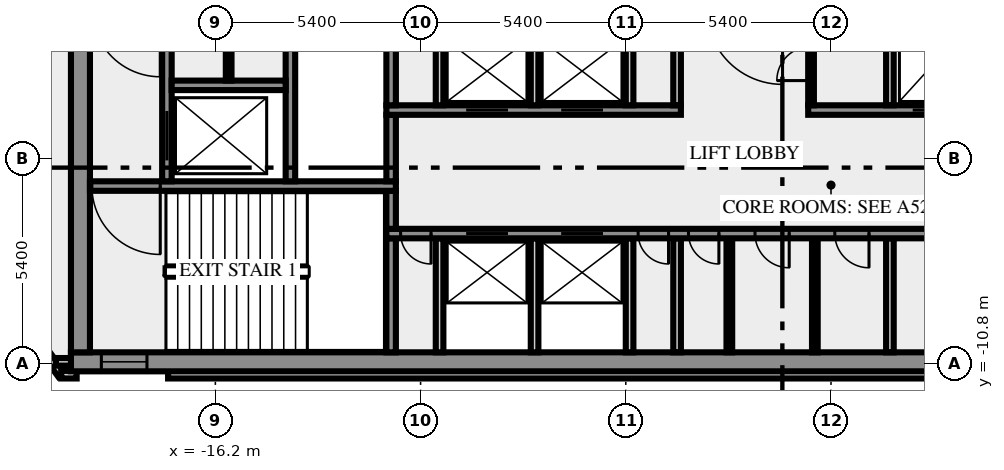
"""IFC4 building model, lengths in metres.
Left out: names, types, materials, properties, quantities, classifications, styles, units other than length and angle.
Written with IfcOpenShell. Run it as: python <this file> out.ifc"""

import sys

from ifc_helpers import new_model, si_unit, direction, frame, frame_2d, origin, place, context, subcontext, project, spatial, rectangle, extrude, element, fill, save


model = new_model("IFC4")
c1 = context("Model", 3, precision=1e-05, world=origin(), true_north=direction((0.0, 1.0)))
c2 = subcontext(c1, "Body", "Model", "MODEL_VIEW")
j1 = project(units=[si_unit("LENGTHUNIT", "METRE"), si_unit("PLANEANGLEUNIT", "RADIAN")], contexts=[c1])
p1 = place(None, origin())
s1 = spatial("IfcSite", under=j1, at=p1, CompositionType="ELEMENT")
p2 = place(p1, origin())
s2 = spatial("IfcBuilding", under=s1, at=p2, CompositionType="ELEMENT")
p3 = place(p2, frame((0.0, 0.0, 351.0)))
s3 = spatial("IfcBuildingStorey", under=s2, at=p3, CompositionType="ELEMENT", Elevation=351.0)
p4 = place(p3, frame((-21.833, -8.909, 0.0), z_axis=(0.0, 0.0, 1.0), x_axis=(0.587766567315, -0.809030569476, 0.0)))
e1 = element("IfcWall", 1, at=p4, inside=s3, PredefinedType="SOLIDWALL", context=c2, shape_type="SweptSolid", body=[
    extrude(rectangle(XDim=2.688, YDim=0.2, at=frame_2d((1.344, 0.0))), origin(), (0.0, 0.0, 1.0), 3.2),
])
p5 = place(p3, frame((-20.256, -11.088, 0.0), z_axis=(0.0, 0.0, 1.0), x_axis=(1.0, 0.0, 0.0)))
e2 = element("IfcWall", 2, at=p5, inside=s3, PredefinedType="SOLIDWALL", context=c2, shape_type="SweptSolid", body=[
    extrude(rectangle(XDim=0.406, YDim=0.2, at=frame_2d((0.203, 0.0))), origin(), (0.0, 0.0, 1.0), 3.2),
])
p6 = place(p3, frame((-17.444, -11.088, 0.0), z_axis=(0.0, 0.0, 1.0), x_axis=(1.0, 0.0, 0.0)))
e3 = element("IfcWall", 3, at=p6, inside=s3, PredefinedType="SOLIDWALL", context=c2, shape_type="SweptSolid", body=[
    extrude(rectangle(XDim=34.888, YDim=0.2, at=frame_2d((17.444, 0.0))), origin(), (0.0, 0.0, 1.0), 3.2),
])
p7 = place(p3, frame((-19.98, -10.75, 0.0), z_axis=(0.0, 0.0, 1.0), x_axis=(-1.0, 0.0, 0.0)))
e4 = element("IfcWall", 4, at=p7, inside=s3, PredefinedType="SOLIDWALL", context=c2, shape_type="SweptSolid", body=[
    extrude(rectangle(XDim=0.417, YDim=0.2, at=frame_2d((0.208, 0.0))), origin(), (0.0, 0.0, 1.0), 3.2),
])
p8 = place(p3, frame((-20.0, -10.75, 0.0), z_axis=(0.0, 0.0, 1.0), x_axis=(1.0, 0.0, 0.0)))
e5 = element("IfcWall", 5, at=p8, inside=s3, PredefinedType="SHEAR", context=c2, shape_type="SweptSolid", body=[
    extrude(rectangle(XDim=40.0, YDim=0.5, at=frame_2d((20.0, 0.0))), origin(), (0.0, 0.0, 1.0), 3.2),
])
p9 = place(p8, frame((0.8, 0.0, 1.0)))
e6 = element("IfcOpeningElement", 6, at=p9, cuts=e5, PredefinedType="OPENING", context=c2, shape_type="SweptSolid", body=[
    extrude(rectangle(XDim=1.2, YDim=1.2, at=frame_2d((0.6, 0.6))), frame((0.0, 0.26, 0.0), z_axis=(0.0, -1.0, 0.0), x_axis=(1.0, 0.0, 0.0)), (0.0, 0.0, 1.0), 0.52),
])
p10 = place(p8, frame((38.0, 0.0, 1.0)))
e7 = element("IfcOpeningElement", 7, at=p10, cuts=e5, PredefinedType="OPENING", context=c2, shape_type="SweptSolid", body=[
    extrude(rectangle(XDim=1.2, YDim=1.2, at=frame_2d((0.6, 0.6))), frame((0.0, 0.26, 0.0), z_axis=(0.0, -1.0, 0.0), x_axis=(1.0, 0.0, 0.0)), (0.0, 0.0, 1.0), 0.52),
])
p11 = place(p3, frame((-19.75, -10.5, 0.0), z_axis=(0.0, 0.0, 1.0), x_axis=(0.0, 1.0, 0.0)))
e8 = element("IfcWall", 8, at=p11, inside=s3, PredefinedType="SHEAR", context=c2, shape_type="SweptSolid", body=[
    extrude(rectangle(XDim=8.8, YDim=0.5, at=frame_2d((4.4, 0.0))), origin(), (0.0, 0.0, 1.0), 3.2),
])
p12 = place(p3, frame((-11.575, -10.5, 0.0), z_axis=(0.0, 0.0, 1.0), x_axis=(0.0, 1.0, 0.0)))
e9 = element("IfcWall", 9, at=p12, inside=s3, PredefinedType="SHEAR", context=c2, shape_type="SweptSolid", body=[
    extrude(rectangle(XDim=3.0, YDim=0.25, at=frame_2d((1.5, 0.0))), origin(), (0.0, 0.0, 1.0), 3.2),
])
for number, where, z_axis, x_axis in (
    (10, (-10.3, -10.5, 0.0), (0.0, 0.0, 1.0), (0.0, 1.0, 0.0)),
    (11, (-7.8, -10.5, 0.0), (0.0, 0.0, 1.0), (0.0, 1.0, 0.0)),
    (12, (-5.3, -10.5, 0.0), (0.0, 0.0, 1.0), (0.0, 1.0, 0.0)),
    (13, (-4.05, -10.5, 0.0), (0.0, 0.0, 1.0), (0.0, 1.0, 0.0)),
):
    element("IfcWall", number, at=place(p3, frame(where, z_axis=z_axis, x_axis=x_axis)), inside=s3, PredefinedType="SOLIDWALL", context=c2, shape_type="SweptSolid", body=[
        extrude(rectangle(XDim=3.0, YDim=0.2, at=frame_2d((1.5, 0.0))), origin(), (0.0, 0.0, 1.0), 3.2),
    ])
for number, where, z_axis, x_axis in (
    (14, (-2.675, -10.5, 0.0), (0.0, 0.0, 1.0), (0.0, 1.0, 0.0)),
    (15, (-0.425, -10.5, 0.0), (0.0, 0.0, 1.0), (0.0, 1.0, 0.0)),
):
    element("IfcWall", number, at=place(p3, frame(where, z_axis=z_axis, x_axis=x_axis)), inside=s3, PredefinedType="PARTITIONING", context=c2, shape_type="SweptSolid", body=[
        extrude(rectangle(XDim=3.0, YDim=0.15, at=frame_2d((1.5, 0.0))), origin(), (0.0, 0.0, 1.0), 3.2),
    ])
p13 = place(p3, frame((1.55, -10.5, 0.0), z_axis=(0.0, 0.0, 1.0), x_axis=(0.0, 1.0, 0.0)))
e16 = element("IfcWall", 16, at=p13, inside=s3, PredefinedType="SOLIDWALL", context=c2, shape_type="SweptSolid", body=[
    extrude(rectangle(XDim=3.0, YDim=0.2, at=frame_2d((1.5, 0.0))), origin(), (0.0, 0.0, 1.0), 3.2),
])
p14 = place(p3, frame((11.7, -7.375, 0.0), z_axis=(0.0, 0.0, 1.0), x_axis=(-1.0, 0.0, 0.0)))
e17 = element("IfcWall", 17, at=p14, inside=s3, PredefinedType="SHEAR", context=c2, shape_type="SweptSolid", body=[
    extrude(rectangle(XDim=23.4, YDim=0.25, at=frame_2d((11.7, 0.0))), origin(), (0.0, 0.0, 1.0), 3.2),
])
p15 = place(p14, frame((22.225, 0.0, 0.0)))
e18 = element("IfcOpeningElement", 18, at=p15, cuts=e17, PredefinedType="OPENING", context=c2, shape_type="SweptSolid", body=[
    extrude(rectangle(XDim=0.8, YDim=2.1, at=frame_2d((0.4, 1.05))), frame((0.0, 0.135, 0.0), z_axis=(0.0, -1.0, 0.0), x_axis=(1.0, 0.0, 0.0)), (0.0, 0.0, 1.0), 0.27),
])
p16 = place(p14, frame((20.2, 0.0, 0.0)))
e19 = element("IfcOpeningElement", 19, at=p16, cuts=e17, PredefinedType="OPENING", context=c2, shape_type="SweptSolid", body=[
    extrude(rectangle(XDim=1.1, YDim=2.1, at=frame_2d((0.55, 1.05))), frame((0.0, 0.135, 0.0), z_axis=(0.0, -1.0, 0.0), x_axis=(1.0, 0.0, 0.0)), (0.0, 0.0, 1.0), 0.27),
])
p17 = place(p14, frame((17.7, 0.0, 0.0)))
e20 = element("IfcOpeningElement", 20, at=p17, cuts=e17, PredefinedType="OPENING", context=c2, shape_type="SweptSolid", body=[
    extrude(rectangle(XDim=1.1, YDim=2.1, at=frame_2d((0.55, 1.05))), frame((0.0, 0.135, 0.0), z_axis=(0.0, -1.0, 0.0), x_axis=(1.0, 0.0, 0.0)), (0.0, 0.0, 1.0), 0.27),
])
p18 = place(p14, frame((15.975, 0.0, 0.0)))
e21 = element("IfcOpeningElement", 21, at=p18, cuts=e17, PredefinedType="OPENING", context=c2, shape_type="SweptSolid", body=[
    extrude(rectangle(XDim=0.8, YDim=2.1, at=frame_2d((0.4, 1.05))), frame((0.0, 0.135, 0.0), z_axis=(0.0, -1.0, 0.0), x_axis=(1.0, 0.0, 0.0)), (0.0, 0.0, 1.0), 0.27),
])
p19 = place(p14, frame((14.65, 0.0, 0.0)))
e22 = element("IfcOpeningElement", 22, at=p19, cuts=e17, PredefinedType="OPENING", context=c2, shape_type="SweptSolid", body=[
    extrude(rectangle(XDim=0.8, YDim=2.1, at=frame_2d((0.4, 1.05))), frame((0.0, 0.135, 0.0), z_axis=(0.0, -1.0, 0.0), x_axis=(1.0, 0.0, 0.0)), (0.0, 0.0, 1.0), 0.27),
])
p20 = place(p14, frame((12.8, 0.0, 0.0)))
e23 = element("IfcOpeningElement", 23, at=p20, cuts=e17, PredefinedType="OPENING", context=c2, shape_type="SweptSolid", body=[
    extrude(rectangle(XDim=0.9, YDim=2.1, at=frame_2d((0.45, 1.05))), frame((0.0, 0.135, 0.0), z_axis=(0.0, -1.0, 0.0), x_axis=(1.0, 0.0, 0.0)), (0.0, 0.0, 1.0), 0.27),
])
p21 = place(p14, frame((10.7, 0.0, 0.0)))
e24 = element("IfcOpeningElement", 24, at=p21, cuts=e17, PredefinedType="OPENING", context=c2, shape_type="SweptSolid", body=[
    extrude(rectangle(XDim=0.9, YDim=2.1, at=frame_2d((0.45, 1.05))), frame((0.0, 0.135, 0.0), z_axis=(0.0, -1.0, 0.0), x_axis=(1.0, 0.0, 0.0)), (0.0, 0.0, 1.0), 0.27),
])
p22 = place(p14, frame((4.7, 0.0, 0.0)))
e25 = element("IfcOpeningElement", 25, at=p22, cuts=e17, PredefinedType="OPENING", context=c2, shape_type="SweptSolid", body=[
    extrude(rectangle(XDim=0.9, YDim=2.1, at=frame_2d((0.45, 1.05))), frame((0.0, 0.135, 0.0), z_axis=(0.0, -1.0, 0.0), x_axis=(1.0, 0.0, 0.0)), (0.0, 0.0, 1.0), 0.27),
])
p23 = place(p3, frame((-11.575, -7.25, 0.0), z_axis=(0.0, 0.0, 1.0), x_axis=(0.0, 1.0, 0.0)))
e26 = element("IfcWall", 26, at=p23, inside=s3, PredefinedType="SHEAR", context=c2, shape_type="SweptSolid", body=[
    extrude(rectangle(XDim=1.0, YDim=0.25, at=frame_2d((0.5, 0.0))), origin(), (0.0, 0.0, 1.0), 3.2),
])
p24 = place(p3, frame((-11.45, -6.125, 0.0), z_axis=(0.0, 0.0, 1.0), x_axis=(-1.0, 0.0, 0.0)))
e27 = element("IfcWall", 27, at=p24, inside=s3, PredefinedType="SHEAR", context=c2, shape_type="SweptSolid", body=[
    extrude(rectangle(XDim=8.05, YDim=0.25, at=frame_2d((4.025, 0.0))), origin(), (0.0, 0.0, 1.0), 3.2),
])
p25 = place(p24, frame((6.2, 0.0, 0.0)))
e28 = element("IfcOpeningElement", 28, at=p25, cuts=e27, PredefinedType="OPENING", context=c2, shape_type="SweptSolid", body=[
    extrude(rectangle(XDim=1.8, YDim=2.1, at=frame_2d((0.9, 1.05))), frame((0.0, 0.135, 0.0), z_axis=(0.0, -1.0, 0.0), x_axis=(1.0, 0.0, 0.0)), (0.0, 0.0, 1.0), 0.27),
])
p26 = place(p3, frame((-17.475, -6.0, 0.0), z_axis=(0.0, 0.0, 1.0), x_axis=(0.0, 1.0, 0.0)))
e29 = element("IfcWall", 29, at=p26, inside=s3, PredefinedType="SHEAR", context=c2, shape_type="SweptSolid", body=[
    extrude(rectangle(XDim=4.3, YDim=0.25, at=frame_2d((2.15, 0.0))), origin(), (0.0, 0.0, 1.0), 3.2),
])
p27 = place(p26, frame((0.55, 0.0, 0.0)))
e30 = element("IfcOpeningElement", 30, at=p27, cuts=e29, PredefinedType="OPENING", context=c2, shape_type="SweptSolid", body=[
    extrude(rectangle(XDim=1.3, YDim=2.1, at=frame_2d((0.65, 1.05))), frame((0.0, 0.135, 0.0), z_axis=(0.0, -1.0, 0.0), x_axis=(1.0, 0.0, 0.0)), (0.0, 0.0, 1.0), 0.27),
])
p28 = place(p3, frame((-14.225, -6.0, 0.0), z_axis=(0.0, 0.0, 1.0), x_axis=(0.0, 1.0, 0.0)))
e31 = element("IfcWall", 31, at=p28, inside=s3, PredefinedType="SHEAR", context=c2, shape_type="SweptSolid", body=[
    extrude(rectangle(XDim=4.3, YDim=0.25, at=frame_2d((2.15, 0.0))), origin(), (0.0, 0.0, 1.0), 3.2),
])
p29 = place(p3, frame((-11.575, -6.0, 0.0), z_axis=(0.0, 0.0, 1.0), x_axis=(0.0, 1.0, 0.0)))
e32 = element("IfcWall", 32, at=p29, inside=s3, PredefinedType="SHEAR", context=c2, shape_type="SweptSolid", body=[
    extrude(rectangle(XDim=1.75, YDim=0.25, at=frame_2d((0.875, 0.0))), origin(), (0.0, 0.0, 1.0), 3.2),
])
p30 = place(p3, frame((-11.7, -4.125, 0.0), z_axis=(0.0, 0.0, 1.0), x_axis=(1.0, 0.0, 0.0)))
e33 = element("IfcWall", 33, at=p30, inside=s3, PredefinedType="SHEAR", context=c2, shape_type="SweptSolid", body=[
    extrude(rectangle(XDim=7.75, YDim=0.25, at=frame_2d((3.875, 0.0))), origin(), (0.0, 0.0, 1.0), 3.2),
])
p31 = place(p30, frame((2.1, 0.0, 0.0)))
e34 = element("IfcOpeningElement", 34, at=p31, cuts=e33, PredefinedType="OPENING", context=c2, shape_type="SweptSolid", body=[
    extrude(rectangle(XDim=1.1, YDim=2.1, at=frame_2d((0.55, 1.05))), frame((0.0, 0.135, 0.0), z_axis=(0.0, -1.0, 0.0), x_axis=(1.0, 0.0, 0.0)), (0.0, 0.0, 1.0), 0.27),
])
p32 = place(p30, frame((4.6, 0.0, 0.0)))
e35 = element("IfcOpeningElement", 35, at=p32, cuts=e33, PredefinedType="OPENING", context=c2, shape_type="SweptSolid", body=[
    extrude(rectangle(XDim=1.1, YDim=2.1, at=frame_2d((0.55, 1.05))), frame((0.0, 0.135, 0.0), z_axis=(0.0, -1.0, 0.0), x_axis=(1.0, 0.0, 0.0)), (0.0, 0.0, 1.0), 0.27),
])
p33 = place(p3, frame((-0.6, -4.125, 0.0), z_axis=(0.0, 0.0, 1.0), x_axis=(1.0, 0.0, 0.0)))
e36 = element("IfcWall", 36, at=p33, inside=s3, PredefinedType="SHEAR", context=c2, shape_type="SweptSolid", body=[
    extrude(rectangle(XDim=12.3, YDim=0.25, at=frame_2d((6.15, 0.0))), origin(), (0.0, 0.0, 1.0), 3.2),
])
p34 = place(p33, frame((2.75, 0.0, 0.0)))
e37 = element("IfcOpeningElement", 37, at=p34, cuts=e36, PredefinedType="OPENING", context=c2, shape_type="SweptSolid", body=[
    extrude(rectangle(XDim=1.3, YDim=2.1, at=frame_2d((0.65, 1.05))), frame((0.0, 0.135, 0.0), z_axis=(0.0, -1.0, 0.0), x_axis=(1.0, 0.0, 0.0)), (0.0, 0.0, 1.0), 0.27),
])
p35 = place(p3, frame((-11.575, -4.0, 0.0), z_axis=(0.0, 0.0, 1.0), x_axis=(0.0, 1.0, 0.0)))
e38 = element("IfcWall", 38, at=p35, inside=s3, PredefinedType="SHEAR", context=c2, shape_type="SweptSolid", body=[
    extrude(rectangle(XDim=2.3, YDim=0.25, at=frame_2d((1.15, 0.0))), origin(), (0.0, 0.0, 1.0), 3.2),
])
for number, where, z_axis, x_axis in (
    (39, (-10.3, -4.0, 0.0), (0.0, 0.0, 1.0), (0.0, 1.0, 0.0)),
    (40, (-7.8, -4.0, 0.0), (0.0, 0.0, 1.0), (0.0, 1.0, 0.0)),
    (41, (-5.3, -4.0, 0.0), (0.0, 0.0, 1.0), (0.0, 1.0, 0.0)),
    (42, (-4.05, -4.0, 0.0), (0.0, 0.0, 1.0), (0.0, 1.0, 0.0)),
):
    element("IfcWall", number, at=place(p3, frame(where, z_axis=z_axis, x_axis=x_axis)), inside=s3, PredefinedType="SOLIDWALL", context=c2, shape_type="SweptSolid", body=[
        extrude(rectangle(XDim=2.3, YDim=0.2, at=frame_2d((1.15, 0.0))), origin(), (0.0, 0.0, 1.0), 3.2),
    ])
p36 = place(p3, frame((-0.525, -4.0, 0.0), z_axis=(0.0, 0.0, 1.0), x_axis=(0.0, 1.0, 0.0)))
e43 = element("IfcWall", 43, at=p36, inside=s3, PredefinedType="PARTITIONING", context=c2, shape_type="SweptSolid", body=[
    extrude(rectangle(XDim=2.3, YDim=0.15, at=frame_2d((1.15, 0.0))), origin(), (0.0, 0.0, 1.0), 3.2),
])
p37 = place(p36, frame((0.65, 0.0, 0.0)))
e44 = element("IfcOpeningElement", 44, at=p37, cuts=e43, PredefinedType="OPENING", context=c2, shape_type="SweptSolid", body=[
    extrude(rectangle(XDim=0.9, YDim=2.1, at=frame_2d((0.45, 1.05))), frame((0.0, 0.085, 0.0), z_axis=(0.0, -1.0, 0.0), x_axis=(1.0, 0.0, 0.0)), (0.0, 0.0, 1.0), 0.17),
])
p38 = place(p3, frame((1.55, -4.0, 0.0), z_axis=(0.0, 0.0, 1.0), x_axis=(0.0, 1.0, 0.0)))
e45 = element("IfcWall", 45, at=p38, inside=s3, PredefinedType="SOLIDWALL", context=c2, shape_type="SweptSolid", body=[
    extrude(rectangle(XDim=2.3, YDim=0.2, at=frame_2d((1.15, 0.0))), origin(), (0.0, 0.0, 1.0), 3.2),
])
p39 = place(p3, frame((-17.35, -3.475, 0.0), z_axis=(0.0, 0.0, 1.0), x_axis=(1.0, 0.0, 0.0)))
e46 = element("IfcWall", 46, at=p39, inside=s3, PredefinedType="SHEAR", context=c2, shape_type="SweptSolid", body=[
    extrude(rectangle(XDim=3.0, YDim=0.25, at=frame_2d((1.5, 0.0))), origin(), (0.0, 0.0, 1.0), 3.2),
])
p40 = place(p3, frame((-15.85, -3.35, 0.0), z_axis=(0.0, 0.0, 1.0), x_axis=(0.0, 1.0, 0.0)))
e47 = element("IfcWall", 47, at=p40, inside=s3, PredefinedType="PARTITIONING", context=c2, shape_type="SweptSolid", body=[
    extrude(rectangle(XDim=1.65, YDim=0.15, at=frame_2d((0.825, 0.0))), origin(), (0.0, 0.0, 1.0), 3.2),
])
p41 = place(p9, origin())
e48 = element("IfcWindow", 48, at=p41, inside=s3, PartitioningType="SINGLE_PANEL", PredefinedType="WINDOW", context=c2, shape_type="SweptSolid", body=[
    extrude(rectangle(XDim=1.2, YDim=1.2, at=frame_2d((0.6, 0.6))), frame((0.0, 0.03, 0.0), z_axis=(0.0, -1.0, 0.0), x_axis=(1.0, 0.0, 0.0)), (0.0, 0.0, 1.0), 0.06),
])
fill(e6, e48)
p42 = place(p15, origin())
e49 = element("IfcDoor", 49, at=p42, inside=s3, OperationType="SINGLE_SWING_RIGHT", PredefinedType="DOOR", context=c2, shape_type="SweptSolid", body=[
    extrude(rectangle(XDim=0.8, YDim=2.1, at=frame_2d((0.4, 1.05))), frame((0.0, 0.025, 0.0), z_axis=(0.0, -1.0, 0.0), x_axis=(1.0, 0.0, 0.0)), (0.0, 0.0, 1.0), 0.05),
])
fill(e18, e49)
p43 = place(p16, origin())
e50 = element("IfcDoor", 50, at=p43, inside=s3, OperationType="DOUBLE_DOOR_SLIDING", PredefinedType="DOOR", context=c2, shape_type="SweptSolid", body=[
    extrude(rectangle(XDim=1.1, YDim=2.1, at=frame_2d((0.55, 1.05))), frame((0.0, 0.025, 0.0), z_axis=(0.0, -1.0, 0.0), x_axis=(1.0, 0.0, 0.0)), (0.0, 0.0, 1.0), 0.05),
])
fill(e19, e50)
p44 = place(p17, origin())
e51 = element("IfcDoor", 51, at=p44, inside=s3, OperationType="DOUBLE_DOOR_SLIDING", PredefinedType="DOOR", context=c2, shape_type="SweptSolid", body=[
    extrude(rectangle(XDim=1.1, YDim=2.1, at=frame_2d((0.55, 1.05))), frame((0.0, 0.025, 0.0), z_axis=(0.0, -1.0, 0.0), x_axis=(1.0, 0.0, 0.0)), (0.0, 0.0, 1.0), 0.05),
])
fill(e20, e51)
p45 = place(p18, origin())
e52 = element("IfcDoor", 52, at=p45, inside=s3, OperationType="SINGLE_SWING_RIGHT", PredefinedType="DOOR", context=c2, shape_type="SweptSolid", body=[
    extrude(rectangle(XDim=0.8, YDim=2.1, at=frame_2d((0.4, 1.05))), frame((0.0, 0.025, 0.0), z_axis=(0.0, -1.0, 0.0), x_axis=(1.0, 0.0, 0.0)), (0.0, 0.0, 1.0), 0.05),
])
fill(e21, e52)
p46 = place(p19, origin())
e53 = element("IfcDoor", 53, at=p46, inside=s3, OperationType="SINGLE_SWING_RIGHT", PredefinedType="DOOR", context=c2, shape_type="SweptSolid", body=[
    extrude(rectangle(XDim=0.8, YDim=2.1, at=frame_2d((0.4, 1.05))), frame((0.0, 0.025, 0.0), z_axis=(0.0, -1.0, 0.0), x_axis=(1.0, 0.0, 0.0)), (0.0, 0.0, 1.0), 0.05),
])
fill(e22, e53)
p47 = place(p20, origin())
e54 = element("IfcDoor", 54, at=p47, inside=s3, OperationType="SINGLE_SWING_RIGHT", PredefinedType="DOOR", context=c2, shape_type="SweptSolid", body=[
    extrude(rectangle(XDim=0.9, YDim=2.1, at=frame_2d((0.45, 1.05))), frame((0.0, 0.025, 0.0), z_axis=(0.0, -1.0, 0.0), x_axis=(1.0, 0.0, 0.0)), (0.0, 0.0, 1.0), 0.05),
])
fill(e23, e54)
p48 = place(p21, origin())
e55 = element("IfcDoor", 55, at=p48, inside=s3, OperationType="SINGLE_SWING_LEFT", PredefinedType="DOOR", context=c2, shape_type="SweptSolid", body=[
    extrude(rectangle(XDim=0.9, YDim=2.1, at=frame_2d((0.45, 1.05))), frame((0.0, 0.025, 0.0), z_axis=(0.0, -1.0, 0.0), x_axis=(1.0, 0.0, 0.0)), (0.0, 0.0, 1.0), 0.05),
])
fill(e24, e55)
p49 = place(p25, origin())
e56 = element("IfcDoor", 56, at=p49, inside=s3, OperationType="DOUBLE_DOOR_SINGLE_SWING", PredefinedType="DOOR", context=c2, shape_type="SweptSolid", body=[
    extrude(rectangle(XDim=1.8, YDim=2.1, at=frame_2d((0.9, 1.05))), frame((0.0, 0.025, 0.0), z_axis=(0.0, -1.0, 0.0), x_axis=(1.0, 0.0, 0.0)), (0.0, 0.0, 1.0), 0.05),
])
fill(e28, e56)
p50 = place(p27, origin())
e57 = element("IfcDoor", 57, at=p50, inside=s3, OperationType="DOUBLE_DOOR_SLIDING", PredefinedType="DOOR", context=c2, shape_type="SweptSolid", body=[
    extrude(rectangle(XDim=1.3, YDim=2.1, at=frame_2d((0.65, 1.05))), frame((0.0, 0.025, 0.0), z_axis=(0.0, -1.0, 0.0), x_axis=(1.0, 0.0, 0.0)), (0.0, 0.0, 1.0), 0.05),
])
fill(e30, e57)
p51 = place(p31, origin())
e58 = element("IfcDoor", 58, at=p51, inside=s3, OperationType="DOUBLE_DOOR_SLIDING", PredefinedType="DOOR", context=c2, shape_type="SweptSolid", body=[
    extrude(rectangle(XDim=1.1, YDim=2.1, at=frame_2d((0.55, 1.05))), frame((0.0, 0.025, 0.0), z_axis=(0.0, -1.0, 0.0), x_axis=(1.0, 0.0, 0.0)), (0.0, 0.0, 1.0), 0.05),
])
fill(e34, e58)
p52 = place(p32, origin())
e59 = element("IfcDoor", 59, at=p52, inside=s3, OperationType="DOUBLE_DOOR_SLIDING", PredefinedType="DOOR", context=c2, shape_type="SweptSolid", body=[
    extrude(rectangle(XDim=1.1, YDim=2.1, at=frame_2d((0.55, 1.05))), frame((0.0, 0.025, 0.0), z_axis=(0.0, -1.0, 0.0), x_axis=(1.0, 0.0, 0.0)), (0.0, 0.0, 1.0), 0.05),
])
fill(e35, e59)
p53 = place(p34, origin())
e60 = element("IfcDoor", 60, at=p53, inside=s3, OperationType="DOUBLE_DOOR_SLIDING", PredefinedType="DOOR", context=c2, shape_type="SweptSolid", body=[
    extrude(rectangle(XDim=1.3, YDim=2.1, at=frame_2d((0.65, 1.05))), frame((0.0, 0.025, 0.0), z_axis=(0.0, -1.0, 0.0), x_axis=(1.0, 0.0, 0.0)), (0.0, 0.0, 1.0), 0.05),
])
fill(e37, e60)
p54 = place(p37, origin())
e61 = element("IfcDoor", 61, at=p54, inside=s3, OperationType="SINGLE_SWING_LEFT", PredefinedType="DOOR", context=c2, shape_type="SweptSolid", body=[
    extrude(rectangle(XDim=0.9, YDim=2.1, at=frame_2d((0.45, 1.05))), frame((0.0, 0.025, 0.0), z_axis=(0.0, -1.0, 0.0), x_axis=(1.0, 0.0, 0.0)), (0.0, 0.0, 1.0), 0.05),
])
fill(e44, e61)
save(model, sys.argv[1])
